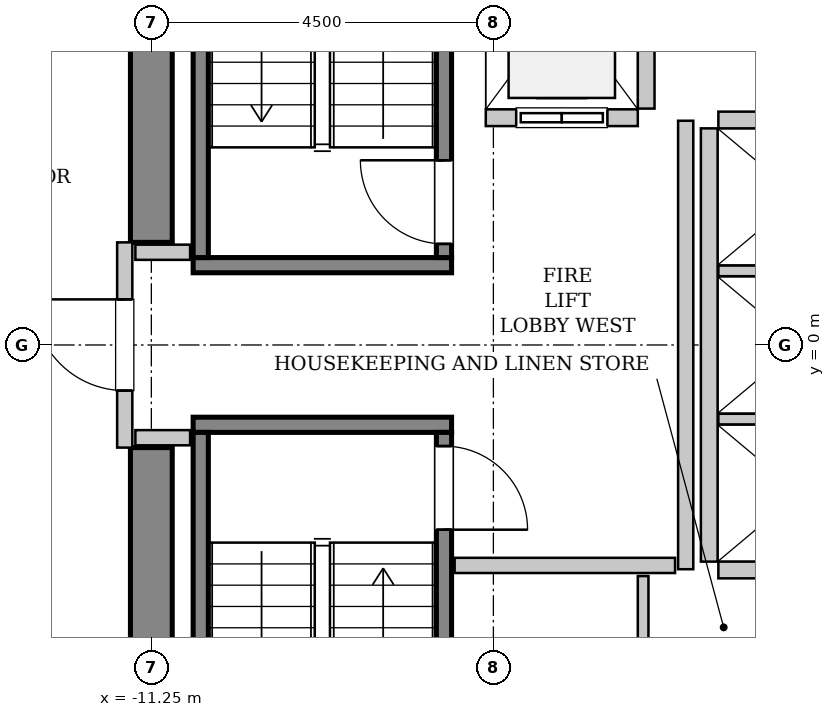
"""IFC4 building model, lengths in metres.
Left out: names, types, materials, properties, quantities, classifications, styles, units other than length and angle.
Written with IfcOpenShell. Run it as: python <this file> out.ifc"""

import sys

from ifc_helpers import new_model, si_unit, direction, frame, frame_2d, origin, place, context, subcontext, project, spatial, rectangle, extrude, source, transform, mapped, element, fill, save


model = new_model("IFC4")
c1 = context("Model", 3, precision=1e-05, world=origin(), true_north=direction((0.0, 1.0)))
c2 = subcontext(c1, "Body", "Model", "MODEL_VIEW")
j1 = project(units=[si_unit("LENGTHUNIT", "METRE"), si_unit("PLANEANGLEUNIT", "RADIAN")], contexts=[c1])
p1 = place(None, origin())
s1 = spatial("IfcSite", under=j1, at=p1, CompositionType="ELEMENT")
p2 = place(p1, origin())
s2 = spatial("IfcBuilding", under=s1, at=p2, CompositionType="ELEMENT")
p3 = place(p2, frame((0.0, 0.0, 125.0)))
s3 = spatial("IfcBuildingStorey", under=s2, at=p3, CompositionType="ELEMENT", Elevation=125.0)
m1 = source(origin(), c2, "Body", "SweptSolid", [
    extrude(rectangle(XDim=7.375, YDim=0.55, at=frame_2d((3.688, 0.0))), origin(), (0.0, 0.0, 1.0), 3.8),
])
for number, where, z_axis, x_axis in (
    (1, (-11.25, -8.725, 0.0), (0.0, 0.0, 1.0), (0.0, 1.0, 0.0)),
    (2, (-11.25, 1.35, 0.0), (0.0, 0.0, 1.0), (0.0, 1.0, 0.0)),
):
    element("IfcWall", number, at=place(p3, frame(where, z_axis=z_axis, x_axis=x_axis)), inside=s3, PredefinedType="SHEAR", context=c2, shape_type="MappedRepresentation", body=[
        mapped(m1, transform((0.0, 0.0, 0.0), x_axis=(1.0, 0.0, 0.0), y_axis=(0.0, 1.0, 0.0), z_axis=(0.0, 0.0, 1.0), scale=1.0)),
    ])
m2 = source(origin(), c2, "Body", "SweptSolid", [
    extrude(rectangle(XDim=3.4, YDim=0.2, at=frame_2d((1.7, 0.0))), origin(), (0.0, 0.0, 1.0), 3.8),
])
p4 = place(p3, frame((-7.3, 1.05, 0.0), z_axis=(0.0, 0.0, 1.0), x_axis=(-1.0, 0.0, 0.0)))
e3 = element("IfcWall", 3, at=p4, inside=s3, PredefinedType="SOLIDWALL", context=c2, shape_type="MappedRepresentation", body=[
    mapped(m2, transform((0.0, 0.0, 0.0), x_axis=(1.0, 0.0, 0.0), y_axis=(0.0, 1.0, 0.0), z_axis=(0.0, 0.0, 1.0), scale=1.0)),
])
m3 = source(origin(), c2, "Body", "SweptSolid", [
    extrude(rectangle(XDim=7.1, YDim=0.2, at=frame_2d((3.55, 0.0))), origin(), (0.0, 0.0, 1.0), 3.8),
])
p5 = place(p3, frame((-7.4, 1.15, 0.0), z_axis=(0.0, 0.0, 1.0), x_axis=(0.0, 1.0, 0.0)))
e4 = element("IfcWall", 4, at=p5, inside=s3, PredefinedType="SOLIDWALL", context=c2, shape_type="MappedRepresentation", body=[
    mapped(m3, transform((0.0, 0.0, 0.0), x_axis=(1.0, 0.0, 0.0), y_axis=(0.0, 1.0, 0.0), z_axis=(0.0, 0.0, 1.0), scale=1.0)),
])
p6 = place(p5, frame((0.18, 0.0, 0.0)))
e5 = element("IfcOpeningElement", 5, at=p6, cuts=e4, PredefinedType="OPENING", context=c2, shape_type="SweptSolid", body=[
    extrude(rectangle(XDim=1.1, YDim=2.15, at=frame_2d((0.55, 1.075))), frame((0.0, 0.11, 0.0), z_axis=(0.0, -1.0, 0.0), x_axis=(1.0, 0.0, 0.0)), (0.0, 0.0, 1.0), 0.22),
])
p7 = place(p3, frame((-10.6, 1.15, 0.0), z_axis=(0.0, 0.0, 1.0), x_axis=(0.0, 1.0, 0.0)))
e6 = element("IfcWall", 6, at=p7, inside=s3, PredefinedType="SOLIDWALL", context=c2, shape_type="MappedRepresentation", body=[
    mapped(m3, transform((0.0, 0.0, 0.0), x_axis=(1.0, 0.0, 0.0), y_axis=(0.0, 1.0, 0.0), z_axis=(0.0, 0.0, 1.0), scale=1.0)),
])
p8 = place(p3, frame((-10.7, -1.05, 0.0), z_axis=(0.0, 0.0, 1.0), x_axis=(1.0, 0.0, 0.0)))
e7 = element("IfcWall", 7, at=p8, inside=s3, PredefinedType="SOLIDWALL", context=c2, shape_type="MappedRepresentation", body=[
    mapped(m2, transform((0.0, 0.0, 0.0), x_axis=(1.0, 0.0, 0.0), y_axis=(0.0, 1.0, 0.0), z_axis=(0.0, 0.0, 1.0), scale=1.0)),
])
p9 = place(p3, frame((-10.6, -1.15, 0.0), z_axis=(0.0, 0.0, 1.0), x_axis=(0.0, -1.0, 0.0)))
e8 = element("IfcWall", 8, at=p9, inside=s3, PredefinedType="SOLIDWALL", context=c2, shape_type="MappedRepresentation", body=[
    mapped(m3, transform((0.0, 0.0, 0.0), x_axis=(1.0, 0.0, 0.0), y_axis=(0.0, 1.0, 0.0), z_axis=(0.0, 0.0, 1.0), scale=1.0)),
])
p10 = place(p3, frame((-7.4, -1.15, 0.0), z_axis=(0.0, 0.0, 1.0), x_axis=(0.0, -1.0, 0.0)))
e9 = element("IfcWall", 9, at=p10, inside=s3, PredefinedType="SOLIDWALL", context=c2, shape_type="MappedRepresentation", body=[
    mapped(m3, transform((0.0, 0.0, 0.0), x_axis=(1.0, 0.0, 0.0), y_axis=(0.0, 1.0, 0.0), z_axis=(0.0, 0.0, 1.0), scale=1.0)),
])
p11 = place(p10, frame((0.18, 0.0, 0.0)))
e10 = element("IfcOpeningElement", 10, at=p11, cuts=e9, PredefinedType="OPENING", context=c2, shape_type="SweptSolid", body=[
    extrude(rectangle(XDim=1.1, YDim=2.15, at=frame_2d((0.55, 1.075))), frame((0.0, 0.11, 0.0), z_axis=(0.0, -1.0, 0.0), x_axis=(1.0, 0.0, 0.0)), (0.0, 0.0, 1.0), 0.22),
])
m4 = source(origin(), c2, "Body", "SweptSolid", [
    extrude(rectangle(XDim=2.0, YDim=0.22, at=frame_2d((1.0, 0.0))), origin(), (0.0, 0.0, 1.0), 3.535),
])
p12 = place(p3, frame((-6.85, 2.99, 0.0), z_axis=(0.0, 0.0, 1.0), x_axis=(1.0, 0.0, 0.0)))
e11 = element("IfcWall", 11, at=p12, inside=s3, PredefinedType="SOLIDWALL", context=c2, shape_type="MappedRepresentation", body=[
    mapped(m4, transform((0.0, 0.0, 0.0), x_axis=(1.0, 0.0, 0.0), y_axis=(0.0, 1.0, 0.0), z_axis=(0.0, 0.0, 1.0), scale=1.0)),
])
p13 = place(p12, frame((0.4, 0.0, 0.0)))
e12 = element("IfcOpeningElement", 12, at=p13, cuts=e11, PredefinedType="OPENING", context=c2, shape_type="SweptSolid", body=[
    extrude(rectangle(XDim=1.2, YDim=2.2, at=frame_2d((0.6, 1.1))), frame((0.0, 0.12, 0.0), z_axis=(0.0, -1.0, 0.0), x_axis=(1.0, 0.0, 0.0)), (0.0, 0.0, 1.0), 0.24),
])
m5 = source(origin(), c2, "Body", "SweptSolid", [
    extrude(rectangle(XDim=2.68, YDim=0.22, at=frame_2d((1.34, 0.0))), origin(), (0.0, 0.0, 1.0), 3.535),
])
p14 = place(p3, frame((-4.74, 3.11, 0.0), z_axis=(0.0, 0.0, 1.0), x_axis=(0.0, 1.0, 0.0)))
e13 = element("IfcWall", 13, at=p14, inside=s3, PredefinedType="SOLIDWALL", context=c2, shape_type="MappedRepresentation", body=[
    mapped(m5, transform((0.0, 0.0, 0.0), x_axis=(1.0, 0.0, 0.0), y_axis=(0.0, 1.0, 0.0), z_axis=(0.0, 0.0, 1.0), scale=1.0)),
])
m6 = source(origin(), c2, "Body", "SweptSolid", [
    extrude(rectangle(XDim=5.7, YDim=0.22, at=frame_2d((2.85, 0.0))), origin(), (0.0, 0.0, 1.0), 3.535),
])
p15 = place(p3, frame((-3.91, 2.85, 0.0), z_axis=(0.0, 0.0, 1.0), x_axis=(0.0, -1.0, 0.0)))
e14 = element("IfcWall", 14, at=p15, inside=s3, PredefinedType="SOLIDWALL", context=c2, shape_type="MappedRepresentation", body=[
    mapped(m6, transform((0.0, 0.0, 0.0), x_axis=(1.0, 0.0, 0.0), y_axis=(0.0, 1.0, 0.0), z_axis=(0.0, 0.0, 1.0), scale=1.0)),
])
m7 = source(origin(), c2, "Body", "SweptSolid", [
    extrude(rectangle(XDim=2.13, YDim=0.22, at=frame_2d((1.065, 0.0))), origin(), (0.0, 0.0, 1.0), 3.535),
])
p16 = place(p3, frame((-3.79, -2.96, 0.0), z_axis=(0.0, 0.0, 1.0), x_axis=(1.0, 0.0, 0.0)))
e15 = element("IfcWall", 15, at=p16, inside=s3, PredefinedType="SOLIDWALL", context=c2, shape_type="MappedRepresentation", body=[
    mapped(m7, transform((0.0, 0.0, 0.0), x_axis=(1.0, 0.0, 0.0), y_axis=(0.0, 1.0, 0.0), z_axis=(0.0, 0.0, 1.0), scale=1.0)),
])
m8 = source(origin(), c2, "Body", "SweptSolid", [
    extrude(rectangle(XDim=2.13, YDim=0.14, at=frame_2d((1.065, 0.0))), origin(), (0.0, 0.0, 1.0), 3.535),
])
for number, where, z_axis, x_axis in (
    (16, (-3.79, -0.975, 0.0), (0.0, 0.0, 1.0), (1.0, 0.0, 0.0)),
    (17, (-3.79, 0.975, 0.0), (0.0, 0.0, 1.0), (1.0, 0.0, 0.0)),
):
    element("IfcWall", number, at=place(p3, frame(where, z_axis=z_axis, x_axis=x_axis)), inside=s3, PredefinedType="PARTITIONING", context=c2, shape_type="MappedRepresentation", body=[
        mapped(m8, transform((0.0, 0.0, 0.0), x_axis=(1.0, 0.0, 0.0), y_axis=(0.0, 1.0, 0.0), z_axis=(0.0, 0.0, 1.0), scale=1.0)),
    ])
p17 = place(p3, frame((-1.66, 2.96, 0.0), z_axis=(0.0, 0.0, 1.0), x_axis=(-1.0, 0.0, 0.0)))
e18 = element("IfcWall", 18, at=p17, inside=s3, PredefinedType="SOLIDWALL", context=c2, shape_type="MappedRepresentation", body=[
    mapped(m7, transform((0.0, 0.0, 0.0), x_axis=(1.0, 0.0, 0.0), y_axis=(0.0, 1.0, 0.0), z_axis=(0.0, 0.0, 1.0), scale=1.0)),
])
m9 = source(origin(), c2, "Body", "SweptSolid", [
    extrude(rectangle(XDim=2.7, YDim=0.2, at=frame_2d((1.35, 0.0))), origin(), (0.0, 0.0, 1.0), 2.425),
])
p18 = place(p3, frame((-11.6, -1.35, 0.0), z_axis=(0.0, 0.0, 1.0), x_axis=(0.0, 1.0, 0.0)))
e19 = element("IfcWall", 19, at=p18, inside=s3, PredefinedType="PARTITIONING", context=c2, shape_type="MappedRepresentation", body=[
    mapped(m9, transform((0.0, 0.0, 0.0), x_axis=(1.0, 0.0, 0.0), y_axis=(0.0, 1.0, 0.0), z_axis=(0.0, 0.0, 1.0), scale=1.0)),
])
p19 = place(p18, frame((0.75, 0.0, 0.0)))
e20 = element("IfcOpeningElement", 20, at=p19, cuts=e19, PredefinedType="OPENING", context=c2, shape_type="SweptSolid", body=[
    extrude(rectangle(XDim=1.2, YDim=2.15, at=frame_2d((0.6, 1.075))), frame((0.0, 0.11, 0.0), z_axis=(0.0, -1.0, 0.0), x_axis=(1.0, 0.0, 0.0)), (0.0, 0.0, 1.0), 0.22),
])
m10 = source(origin(), c2, "Body", "SweptSolid", [
    extrude(rectangle(XDim=5.9, YDim=0.2, at=frame_2d((2.95, 0.0))), origin(), (0.0, 0.0, 1.0), 3.535),
])
p20 = place(p3, frame((-4.22, -2.95, 0.0), z_axis=(0.0, 0.0, 1.0), x_axis=(0.0, 1.0, 0.0)))
e21 = element("IfcWall", 21, at=p20, inside=s3, PredefinedType="PARTITIONING", context=c2, shape_type="MappedRepresentation", body=[
    mapped(m10, transform((0.0, 0.0, 0.0), x_axis=(1.0, 0.0, 0.0), y_axis=(0.0, 1.0, 0.0), z_axis=(0.0, 0.0, 1.0), scale=1.0)),
])
m11 = source(origin(), c2, "Body", "SweptSolid", [
    extrude(rectangle(XDim=2.9, YDim=0.2, at=frame_2d((1.45, 0.0))), origin(), (0.0, 0.0, 1.0), 3.535),
])
p21 = place(p3, frame((-7.26, -2.9, 0.0), z_axis=(0.0, 0.0, 1.0), x_axis=(1.0, 0.0, 0.0)))
e22 = element("IfcWall", 22, at=p21, inside=s3, PredefinedType="PARTITIONING", context=c2, shape_type="MappedRepresentation", body=[
    mapped(m11, transform((0.0, 0.0, 0.0), x_axis=(1.0, 0.0, 0.0), y_axis=(0.0, 1.0, 0.0), z_axis=(0.0, 0.0, 1.0), scale=1.0)),
])
m12 = source(origin(), c2, "Body", "SweptSolid", [
    extrude(rectangle(XDim=0.72, YDim=0.2, at=frame_2d((0.36, 0.0))), origin(), (0.0, 0.0, 1.0), 3.535),
])
for number, where, z_axis, x_axis in (
    (23, (-11.46, 1.22, 0.0), (0.0, 0.0, 1.0), (1.0, 0.0, 0.0)),
    (24, (-11.46, -1.22, 0.0), (0.0, 0.0, 1.0), (1.0, 0.0, 0.0)),
):
    element("IfcWall", number, at=place(p3, frame(where, z_axis=z_axis, x_axis=x_axis)), inside=s3, PredefinedType="PARTITIONING", context=c2, shape_type="MappedRepresentation", body=[
        mapped(m12, transform((0.0, 0.0, 0.0), x_axis=(1.0, 0.0, 0.0), y_axis=(0.0, 1.0, 0.0), z_axis=(0.0, 0.0, 1.0), scale=1.0)),
    ])
m13 = source(origin(), c2, "Body", "SweptSolid", [
    extrude(rectangle(XDim=1.26, YDim=0.14, at=frame_2d((0.63, 0.0))), origin(), (0.0, 0.0, 1.0), 3.535),
])
p22 = place(p3, frame((-4.78, -4.3, 0.0), z_axis=(0.0, 0.0, 1.0), x_axis=(0.0, 1.0, 0.0)))
e25 = element("IfcWall", 25, at=p22, inside=s3, PredefinedType="PARTITIONING", context=c2, shape_type="MappedRepresentation", body=[
    mapped(m13, transform((0.0, 0.0, 0.0), x_axis=(1.0, 0.0, 0.0), y_axis=(0.0, 1.0, 0.0), z_axis=(0.0, 0.0, 1.0), scale=1.0)),
])
m14 = source(origin(), c2, "Body", "SweptSolid", [
    extrude(rectangle(XDim=1.1, YDim=2.15, at=frame_2d((0.55, 1.075))), frame((0.0, 0.025, 0.0), z_axis=(0.0, -1.0, 0.0), x_axis=(1.0, 0.0, 0.0)), (0.0, 0.0, 1.0), 0.05),
])
p23 = place(p6, origin())
e26 = element("IfcDoor", 26, at=p23, inside=s3, OperationType="SINGLE_SWING_RIGHT", PredefinedType="DOOR", context=c2, shape_type="MappedRepresentation", body=[
    mapped(m14, transform((0.0, 0.0, 0.0), x_axis=(1.0, 0.0, 0.0), y_axis=(0.0, 1.0, 0.0), z_axis=(0.0, 0.0, 1.0), scale=1.0)),
])
fill(e5, e26)
p24 = place(p11, origin())
e27 = element("IfcDoor", 27, at=p24, inside=s3, OperationType="SINGLE_SWING_RIGHT", PredefinedType="DOOR", context=c2, shape_type="MappedRepresentation", body=[
    mapped(m14, transform((0.0, 0.0, 0.0), x_axis=(1.0, 0.0, 0.0), y_axis=(0.0, 1.0, 0.0), z_axis=(0.0, 0.0, 1.0), scale=1.0)),
])
fill(e10, e27)
m15 = source(origin(), c2, "Body", "SweptSolid", [
    extrude(rectangle(XDim=1.2, YDim=2.2, at=frame_2d((0.6, 1.1))), frame((0.0, 0.025, 0.0), z_axis=(0.0, -1.0, 0.0), x_axis=(1.0, 0.0, 0.0)), (0.0, 0.0, 1.0), 0.05),
])
p25 = place(p13, origin())
e28 = element("IfcDoor", 28, at=p25, inside=s3, OperationType="SLIDING_TO_LEFT", PredefinedType="DOOR", context=c2, shape_type="MappedRepresentation", body=[
    mapped(m15, transform((0.0, 0.0, 0.0), x_axis=(1.0, 0.0, 0.0), y_axis=(0.0, 1.0, 0.0), z_axis=(0.0, 0.0, 1.0), scale=1.0)),
])
fill(e12, e28)
m16 = source(origin(), c2, "Body", "SweptSolid", [
    extrude(rectangle(XDim=1.2, YDim=2.15, at=frame_2d((0.6, 1.075))), frame((0.0, 0.025, 0.0), z_axis=(0.0, -1.0, 0.0), x_axis=(1.0, 0.0, 0.0)), (0.0, 0.0, 1.0), 0.05),
])
p26 = place(p19, origin())
e29 = element("IfcDoor", 29, at=p26, inside=s3, OperationType="SINGLE_SWING_RIGHT", PredefinedType="DOOR", context=c2, shape_type="MappedRepresentation", body=[
    mapped(m16, transform((0.0, 0.0, 0.0), x_axis=(1.0, 0.0, 0.0), y_axis=(0.0, 1.0, 0.0), z_axis=(0.0, 0.0, 1.0), scale=1.0)),
])
fill(e20, e29)
save(model, sys.argv[1])
